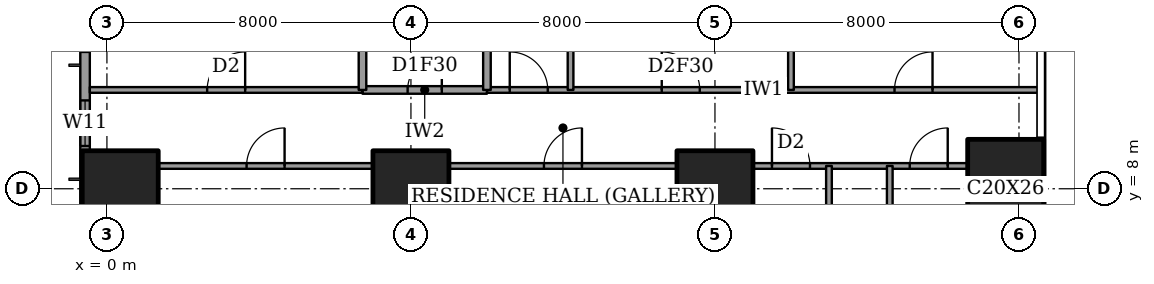
"""IFC4 building model, lengths in metres.
Left out: names, types, materials, properties, quantities, classifications, styles, units other than length and angle.
Written with IfcOpenShell. Run it as: python <this file> out.ifc"""

import sys

from ifc_helpers import new_model, si_unit, direction, frame, frame_2d, origin, origin_2d, place, context, subcontext, project, spatial, rectangle, extrude, element, fill, save


model = new_model("IFC4")
c1 = context("Model", 3, precision=1e-05, world=origin(), true_north=direction((0.0, 1.0)))
c2 = subcontext(c1, "Body", "Model", "MODEL_VIEW")
j1 = project(units=[si_unit("LENGTHUNIT", "METRE"), si_unit("PLANEANGLEUNIT", "RADIAN")], contexts=[c1])
p1 = place(None, origin())
s1 = spatial("IfcSite", under=j1, at=p1, CompositionType="ELEMENT")
p2 = place(p1, origin())
s2 = spatial("IfcBuilding", under=s1, at=p2, CompositionType="ELEMENT")
p3 = place(p2, frame((0.0, 0.0, 157.4)))
s3 = spatial("IfcBuildingStorey", under=s2, at=p3, CompositionType="ELEMENT", Elevation=157.4)
for number, where, z_axis, x_axis in (
    (1, (0.35, 8.0, 0.0), (0.0, 0.0, 1.0), (1.0, 0.0, 0.0)),
    (2, (8.0, 8.0, 0.0), (0.0, 0.0, 1.0), (1.0, 0.0, 0.0)),
    (3, (16.0, 8.0, 0.0), (0.0, 0.0, 1.0), (1.0, 0.0, 0.0)),
):
    element("IfcColumn", number, at=place(p3, frame(where, z_axis=z_axis, x_axis=x_axis)), inside=s3, PredefinedType="COLUMN", context=c2, shape_type="SweptSolid", body=[
        extrude(rectangle(XDim=2.0, YDim=2.0, at=origin_2d()), origin(), (0.0, 0.0, 1.0), 3.6),
    ])
p4 = place(p3, frame((23.65, 8.0, 0.0), z_axis=(0.0, 0.0, 1.0), x_axis=(1.0, 0.0, 0.0)))
e4 = element("IfcColumn", 4, at=p4, inside=s3, PredefinedType="COLUMN", context=c2, shape_type="SweptSolid", body=[
    extrude(rectangle(XDim=2.0, YDim=2.6, at=origin_2d()), origin(), (0.0, 0.0, 1.0), 3.6),
])
p5 = place(p3, frame((-0.575, 44.825, 0.0), z_axis=(0.0, 0.0, 1.0), x_axis=(0.0, -1.0, 0.0)))
e5 = element("IfcWall", 5, at=p5, inside=s3, PredefinedType="SOLIDWALL", context=c2, shape_type="SweptSolid", body=[
    extrude(rectangle(XDim=41.65, YDim=0.25, at=frame_2d((20.825, 0.0))), origin(), (0.0, 0.0, 1.0), 3.6),
])
p6 = place(p5, frame((0.775, 0.0, 0.4)))
e6 = element("IfcOpeningElement", 6, at=p6, cuts=e5, PredefinedType="OPENING", context=c2, shape_type="SweptSolid", body=[
    extrude(rectangle(XDim=2.4, YDim=2.2, at=frame_2d((1.2, 1.1))), frame((0.0, 0.135, 0.0), z_axis=(0.0, -1.0, 0.0), x_axis=(1.0, 0.0, 0.0)), (0.0, 0.0, 1.0), 0.27),
])
p7 = place(p5, frame((6.1, 0.0, 0.4)))
e7 = element("IfcOpeningElement", 7, at=p7, cuts=e5, PredefinedType="OPENING", context=c2, shape_type="SweptSolid", body=[
    extrude(rectangle(XDim=1.2, YDim=2.2, at=frame_2d((0.6, 1.1))), frame((0.0, 0.135, 0.0), z_axis=(0.0, -1.0, 0.0), x_axis=(1.0, 0.0, 0.0)), (0.0, 0.0, 1.0), 0.27),
])
p8 = place(p5, frame((8.425, 0.0, 0.4)))
e8 = element("IfcOpeningElement", 8, at=p8, cuts=e5, PredefinedType="OPENING", context=c2, shape_type="SweptSolid", body=[
    extrude(rectangle(XDim=2.4, YDim=2.2, at=frame_2d((1.2, 1.1))), frame((0.0, 0.135, 0.0), z_axis=(0.0, -1.0, 0.0), x_axis=(1.0, 0.0, 0.0)), (0.0, 0.0, 1.0), 0.27),
])
p9 = place(p5, frame((15.625, 0.0, 0.4)))
e9 = element("IfcOpeningElement", 9, at=p9, cuts=e5, PredefinedType="OPENING", context=c2, shape_type="SweptSolid", body=[
    extrude(rectangle(XDim=2.4, YDim=2.2, at=frame_2d((1.2, 1.1))), frame((0.0, 0.135, 0.0), z_axis=(0.0, -1.0, 0.0), x_axis=(1.0, 0.0, 0.0)), (0.0, 0.0, 1.0), 0.27),
])
p10 = place(p5, frame((23.625, 0.0, 0.4)))
e10 = element("IfcOpeningElement", 10, at=p10, cuts=e5, PredefinedType="OPENING", context=c2, shape_type="SweptSolid", body=[
    extrude(rectangle(XDim=2.4, YDim=2.2, at=frame_2d((1.2, 1.1))), frame((0.0, 0.135, 0.0), z_axis=(0.0, -1.0, 0.0), x_axis=(1.0, 0.0, 0.0)), (0.0, 0.0, 1.0), 0.27),
])
p11 = place(p5, frame((30.825, 0.0, 0.4)))
e11 = element("IfcOpeningElement", 11, at=p11, cuts=e5, PredefinedType="OPENING", context=c2, shape_type="SweptSolid", body=[
    extrude(rectangle(XDim=2.4, YDim=2.2, at=frame_2d((1.2, 1.1))), frame((0.0, 0.135, 0.0), z_axis=(0.0, -1.0, 0.0), x_axis=(1.0, 0.0, 0.0)), (0.0, 0.0, 1.0), 0.27),
])
p12 = place(p5, frame((34.5, 0.0, 0.4)))
e12 = element("IfcOpeningElement", 12, at=p12, cuts=e5, PredefinedType="OPENING", context=c2, shape_type="SweptSolid", body=[
    extrude(rectangle(XDim=1.2, YDim=2.2, at=frame_2d((0.6, 1.1))), frame((0.0, 0.135, 0.0), z_axis=(0.0, -1.0, 0.0), x_axis=(1.0, 0.0, 0.0)), (0.0, 0.0, 1.0), 0.27),
])
p13 = place(p5, frame((38.475, 0.0, 0.4)))
e13 = element("IfcOpeningElement", 13, at=p13, cuts=e5, PredefinedType="OPENING", context=c2, shape_type="SweptSolid", body=[
    extrude(rectangle(XDim=2.4, YDim=2.2, at=frame_2d((1.2, 1.1))), frame((0.0, 0.135, 0.0), z_axis=(0.0, -1.0, 0.0), x_axis=(1.0, 0.0, 0.0)), (0.0, 0.0, 1.0), 0.27),
])
p14 = place(p3, frame((1.35, 8.6, 0.0), z_axis=(0.0, 0.0, 1.0), x_axis=(1.0, 0.0, 0.0)))
e14 = element("IfcWall", 14, at=p14, inside=s3, PredefinedType="PARTITIONING", context=c2, shape_type="SweptSolid", body=[
    extrude(rectangle(XDim=5.65, YDim=0.15, at=frame_2d((2.825, 0.0))), origin(), (0.0, 0.0, 1.0), 3.35),
])
p15 = place(p14, frame((2.325, 0.0, 0.0)))
e15 = element("IfcOpeningElement", 15, at=p15, cuts=e14, PredefinedType="OPENING", context=c2, shape_type="SweptSolid", body=[
    extrude(rectangle(XDim=1.0, YDim=2.1, at=frame_2d((0.5, 1.05))), frame((0.0, 0.085, 0.0), z_axis=(0.0, -1.0, 0.0), x_axis=(1.0, 0.0, 0.0)), (0.0, 0.0, 1.0), 0.17),
])
p16 = place(p3, frame((9.0, 8.6, 0.0), z_axis=(0.0, 0.0, 1.0), x_axis=(1.0, 0.0, 0.0)))
e16 = element("IfcWall", 16, at=p16, inside=s3, PredefinedType="PARTITIONING", context=c2, shape_type="SweptSolid", body=[
    extrude(rectangle(XDim=6.0, YDim=0.15, at=frame_2d((3.0, 0.0))), origin(), (0.0, 0.0, 1.0), 3.35),
])
p17 = place(p16, frame((2.5, 0.0, 0.0)))
e17 = element("IfcOpeningElement", 17, at=p17, cuts=e16, PredefinedType="OPENING", context=c2, shape_type="SweptSolid", body=[
    extrude(rectangle(XDim=1.0, YDim=2.1, at=frame_2d((0.5, 1.05))), frame((0.0, 0.085, 0.0), z_axis=(0.0, -1.0, 0.0), x_axis=(1.0, 0.0, 0.0)), (0.0, 0.0, 1.0), 0.17),
])
p18 = place(p3, frame((17.0, 8.6, 0.0), z_axis=(0.0, 0.0, 1.0), x_axis=(1.0, 0.0, 0.0)))
e18 = element("IfcWall", 18, at=p18, inside=s3, PredefinedType="PARTITIONING", context=c2, shape_type="SweptSolid", body=[
    extrude(rectangle(XDim=5.65, YDim=0.15, at=frame_2d((2.825, 0.0))), origin(), (0.0, 0.0, 1.0), 3.35),
])
p19 = place(p18, frame((0.5, 0.0, 0.0)))
e19 = element("IfcOpeningElement", 19, at=p19, cuts=e18, PredefinedType="OPENING", context=c2, shape_type="SweptSolid", body=[
    extrude(rectangle(XDim=1.0, YDim=2.1, at=frame_2d((0.5, 1.05))), frame((0.0, 0.085, 0.0), z_axis=(0.0, -1.0, 0.0), x_axis=(1.0, 0.0, 0.0)), (0.0, 0.0, 1.0), 0.17),
])
p20 = place(p18, frame((4.125, 0.0, 0.0)))
e20 = element("IfcOpeningElement", 20, at=p20, cuts=e18, PredefinedType="OPENING", context=c2, shape_type="SweptSolid", body=[
    extrude(rectangle(XDim=1.0, YDim=2.1, at=frame_2d((0.5, 1.05))), frame((0.0, 0.085, 0.0), z_axis=(0.0, -1.0, 0.0), x_axis=(1.0, 0.0, 0.0)), (0.0, 0.0, 1.0), 0.17),
])
p21 = place(p3, frame((6.725, 10.6, 0.0), z_axis=(0.0, 0.0, 1.0), x_axis=(1.0, 0.0, 0.0)))
e21 = element("IfcWall", 21, at=p21, inside=s3, PredefinedType="PARTITIONING", context=c2, shape_type="SweptSolid", body=[
    extrude(rectangle(XDim=3.275, YDim=0.2, at=frame_2d((1.637, 0.0))), origin(), (0.0, 0.0, 1.0), 3.35),
])
p22 = place(p21, frame((1.188, 0.0, 0.0)))
e22 = element("IfcOpeningElement", 22, at=p22, cuts=e21, PredefinedType="OPENING", context=c2, shape_type="SweptSolid", body=[
    extrude(rectangle(XDim=0.9, YDim=2.1, at=frame_2d((0.45, 1.05))), frame((0.0, 0.11, 0.0), z_axis=(0.0, -1.0, 0.0), x_axis=(1.0, 0.0, 0.0)), (0.0, 0.0, 1.0), 0.22),
])
p23 = place(p3, frame((-0.45, 10.6, 0.0), z_axis=(0.0, 0.0, 1.0), x_axis=(1.0, 0.0, 0.0)))
e23 = element("IfcWall", 23, at=p23, inside=s3, PredefinedType="PARTITIONING", context=c2, shape_type="SweptSolid", body=[
    extrude(rectangle(XDim=7.175, YDim=0.15, at=frame_2d((3.587, 0.0))), origin(), (0.0, 0.0, 1.0), 3.35),
])
p24 = place(p23, frame((3.087, 0.0, 0.0)))
e24 = element("IfcOpeningElement", 24, at=p24, cuts=e23, PredefinedType="OPENING", context=c2, shape_type="SweptSolid", body=[
    extrude(rectangle(XDim=1.0, YDim=2.1, at=frame_2d((0.5, 1.05))), frame((0.0, 0.085, 0.0), z_axis=(0.0, -1.0, 0.0), x_axis=(1.0, 0.0, 0.0)), (0.0, 0.0, 1.0), 0.17),
])
p25 = place(p3, frame((10.0, 10.6, 0.0), z_axis=(0.0, 0.0, 1.0), x_axis=(1.0, 0.0, 0.0)))
e25 = element("IfcWall", 25, at=p25, inside=s3, PredefinedType="PARTITIONING", context=c2, shape_type="SweptSolid", body=[
    extrude(rectangle(XDim=14.561, YDim=0.15, at=frame_2d((7.281, 0.0))), origin(), (0.0, 0.0, 1.0), 3.35),
])
p26 = place(p25, frame((0.6, 0.0, 0.0)))
e26 = element("IfcOpeningElement", 26, at=p26, cuts=e25, PredefinedType="OPENING", context=c2, shape_type="SweptSolid", body=[
    extrude(rectangle(XDim=1.0, YDim=2.1, at=frame_2d((0.5, 1.05))), frame((0.0, 0.085, 0.0), z_axis=(0.0, -1.0, 0.0), x_axis=(1.0, 0.0, 0.0)), (0.0, 0.0, 1.0), 0.17),
])
p27 = place(p25, frame((4.6, 0.0, 0.0)))
e27 = element("IfcOpeningElement", 27, at=p27, cuts=e25, PredefinedType="OPENING", context=c2, shape_type="SweptSolid", body=[
    extrude(rectangle(XDim=1.0, YDim=2.1, at=frame_2d((0.5, 1.05))), frame((0.0, 0.085, 0.0), z_axis=(0.0, -1.0, 0.0), x_axis=(1.0, 0.0, 0.0)), (0.0, 0.0, 1.0), 0.17),
])
p28 = place(p25, frame((10.725, 0.0, 0.0)))
e28 = element("IfcOpeningElement", 28, at=p28, cuts=e25, PredefinedType="OPENING", context=c2, shape_type="SweptSolid", body=[
    extrude(rectangle(XDim=1.0, YDim=2.1, at=frame_2d((0.5, 1.05))), frame((0.0, 0.085, 0.0), z_axis=(0.0, -1.0, 0.0), x_axis=(1.0, 0.0, 0.0)), (0.0, 0.0, 1.0), 0.17),
])
for number, where, z_axis, x_axis in (
    (29, (6.725, 10.6, 0.0), (0.0, 0.0, 1.0), (0.0, 1.0, 0.0)),
    (30, (10.0, 10.6, 0.0), (0.0, 0.0, 1.0), (0.0, 1.0, 0.0)),
):
    element("IfcWall", number, at=place(p3, frame(where, z_axis=z_axis, x_axis=x_axis)), inside=s3, PredefinedType="PARTITIONING", context=c2, shape_type="SweptSolid", body=[
        extrude(rectangle(XDim=3.4, YDim=0.2, at=frame_2d((1.7, 0.0))), origin(), (0.0, 0.0, 1.0), 3.35),
    ])
for number, where, z_axis, x_axis in (
    (31, (12.2, 10.6, 0.0), (0.0, 0.0, 1.0), (0.0, 1.0, 0.0)),
    (32, (18.0, 10.6, 0.0), (0.0, 0.0, 1.0), (0.0, 1.0, 0.0)),
):
    element("IfcWall", number, at=place(p3, frame(where, z_axis=z_axis, x_axis=x_axis)), inside=s3, PredefinedType="PARTITIONING", context=c2, shape_type="SweptSolid", body=[
        extrude(rectangle(XDim=6.4, YDim=0.15, at=frame_2d((3.2, 0.0))), origin(), (0.0, 0.0, 1.0), 3.35),
    ])
p29 = place(p3, frame((19.0, -0.45, 0.0), z_axis=(0.0, 0.0, 1.0), x_axis=(0.0, 1.0, 0.0)))
e33 = element("IfcWall", 33, at=p29, inside=s3, PredefinedType="PARTITIONING", context=c2, shape_type="SweptSolid", body=[
    extrude(rectangle(XDim=9.05, YDim=0.15, at=frame_2d((4.525, 0.0))), origin(), (0.0, 0.0, 1.0), 3.35),
])
p30 = place(p3, frame((20.6, -0.45, 0.0), z_axis=(0.0, 0.0, 1.0), x_axis=(0.0, 1.0, 0.0)))
e34 = element("IfcWall", 34, at=p30, inside=s3, PredefinedType="PARTITIONING", context=c2, shape_type="SweptSolid", body=[
    extrude(rectangle(XDim=9.05, YDim=0.15, at=frame_2d((4.525, 0.0))), origin(), (0.0, 0.0, 1.0), 3.35),
])
p31 = place(p30, frame((4.075, 0.0, 0.0)))
e35 = element("IfcOpeningElement", 35, at=p31, cuts=e34, PredefinedType="OPENING", context=c2, shape_type="SweptSolid", body=[
    extrude(rectangle(XDim=0.9, YDim=2.1, at=frame_2d((0.45, 1.05))), frame((0.0, 0.085, 0.0), z_axis=(0.0, -1.0, 0.0), x_axis=(1.0, 0.0, 0.0)), (0.0, 0.0, 1.0), 0.17),
])
p32 = place(p12, origin())
e36 = element("IfcWindow", 36, at=p32, inside=s3, PartitioningType="SINGLE_PANEL", PredefinedType="WINDOW", context=c2, shape_type="SweptSolid", body=[
    extrude(rectangle(XDim=1.2, YDim=2.2, at=frame_2d((0.6, 1.1))), frame((0.0, 0.03, 0.0), z_axis=(0.0, -1.0, 0.0), x_axis=(1.0, 0.0, 0.0)), (0.0, 0.0, 1.0), 0.06),
])
fill(e12, e36)
p33 = place(p15, origin())
e37 = element("IfcDoor", 37, at=p33, inside=s3, OperationType="SINGLE_SWING_LEFT", PredefinedType="DOOR", context=c2, shape_type="SweptSolid", body=[
    extrude(rectangle(XDim=1.0, YDim=2.1, at=frame_2d((0.5, 1.05))), frame((0.0, 0.025, 0.0), z_axis=(0.0, -1.0, 0.0), x_axis=(1.0, 0.0, 0.0)), (0.0, 0.0, 1.0), 0.05),
])
fill(e15, e37)
p34 = place(p17, origin())
e38 = element("IfcDoor", 38, at=p34, inside=s3, OperationType="SINGLE_SWING_LEFT", PredefinedType="DOOR", context=c2, shape_type="SweptSolid", body=[
    extrude(rectangle(XDim=1.0, YDim=2.1, at=frame_2d((0.5, 1.05))), frame((0.0, 0.025, 0.0), z_axis=(0.0, -1.0, 0.0), x_axis=(1.0, 0.0, 0.0)), (0.0, 0.0, 1.0), 0.05),
])
fill(e17, e38)
p35 = place(p19, origin())
e39 = element("IfcDoor", 39, at=p35, inside=s3, OperationType="SINGLE_SWING_RIGHT", PredefinedType="DOOR", context=c2, shape_type="SweptSolid", body=[
    extrude(rectangle(XDim=1.0, YDim=2.1, at=frame_2d((0.5, 1.05))), frame((0.0, 0.025, 0.0), z_axis=(0.0, -1.0, 0.0), x_axis=(1.0, 0.0, 0.0)), (0.0, 0.0, 1.0), 0.05),
])
fill(e19, e39)
p36 = place(p20, origin())
e40 = element("IfcDoor", 40, at=p36, inside=s3, OperationType="SINGLE_SWING_LEFT", PredefinedType="DOOR", context=c2, shape_type="SweptSolid", body=[
    extrude(rectangle(XDim=1.0, YDim=2.1, at=frame_2d((0.5, 1.05))), frame((0.0, 0.025, 0.0), z_axis=(0.0, -1.0, 0.0), x_axis=(1.0, 0.0, 0.0)), (0.0, 0.0, 1.0), 0.05),
])
fill(e20, e40)
p37 = place(p26, origin())
e41 = element("IfcDoor", 41, at=p37, inside=s3, OperationType="SINGLE_SWING_RIGHT", PredefinedType="DOOR", context=c2, shape_type="SweptSolid", body=[
    extrude(rectangle(XDim=1.0, YDim=2.1, at=frame_2d((0.5, 1.05))), frame((0.0, 0.025, 0.0), z_axis=(0.0, -1.0, 0.0), x_axis=(1.0, 0.0, 0.0)), (0.0, 0.0, 1.0), 0.05),
])
fill(e26, e41)
p38 = place(p24, origin())
e42 = element("IfcDoor", 42, at=p38, inside=s3, OperationType="SINGLE_SWING_LEFT", PredefinedType="DOOR", context=c2, shape_type="SweptSolid", body=[
    extrude(rectangle(XDim=1.0, YDim=2.1, at=frame_2d((0.5, 1.05))), frame((0.0, 0.025, 0.0), z_axis=(0.0, -1.0, 0.0), x_axis=(1.0, 0.0, 0.0)), (0.0, 0.0, 1.0), 0.05),
])
fill(e24, e42)
p39 = place(p22, origin())
e43 = element("IfcDoor", 43, at=p39, inside=s3, OperationType="SINGLE_SWING_LEFT", PredefinedType="DOOR", context=c2, shape_type="SweptSolid", body=[
    extrude(rectangle(XDim=0.9, YDim=2.1, at=frame_2d((0.45, 1.05))), frame((0.0, 0.025, 0.0), z_axis=(0.0, -1.0, 0.0), x_axis=(1.0, 0.0, 0.0)), (0.0, 0.0, 1.0), 0.05),
])
fill(e22, e43)
p40 = place(p27, origin())
e44 = element("IfcDoor", 44, at=p40, inside=s3, OperationType="SINGLE_SWING_RIGHT", PredefinedType="DOOR", context=c2, shape_type="SweptSolid", body=[
    extrude(rectangle(XDim=1.0, YDim=2.1, at=frame_2d((0.5, 1.05))), frame((0.0, 0.025, 0.0), z_axis=(0.0, -1.0, 0.0), x_axis=(1.0, 0.0, 0.0)), (0.0, 0.0, 1.0), 0.05),
])
fill(e27, e44)
p41 = place(p28, origin())
e45 = element("IfcDoor", 45, at=p41, inside=s3, OperationType="SINGLE_SWING_LEFT", PredefinedType="DOOR", context=c2, shape_type="SweptSolid", body=[
    extrude(rectangle(XDim=1.0, YDim=2.1, at=frame_2d((0.5, 1.05))), frame((0.0, 0.025, 0.0), z_axis=(0.0, -1.0, 0.0), x_axis=(1.0, 0.0, 0.0)), (0.0, 0.0, 1.0), 0.05),
])
fill(e28, e45)
save(model, sys.argv[1])
